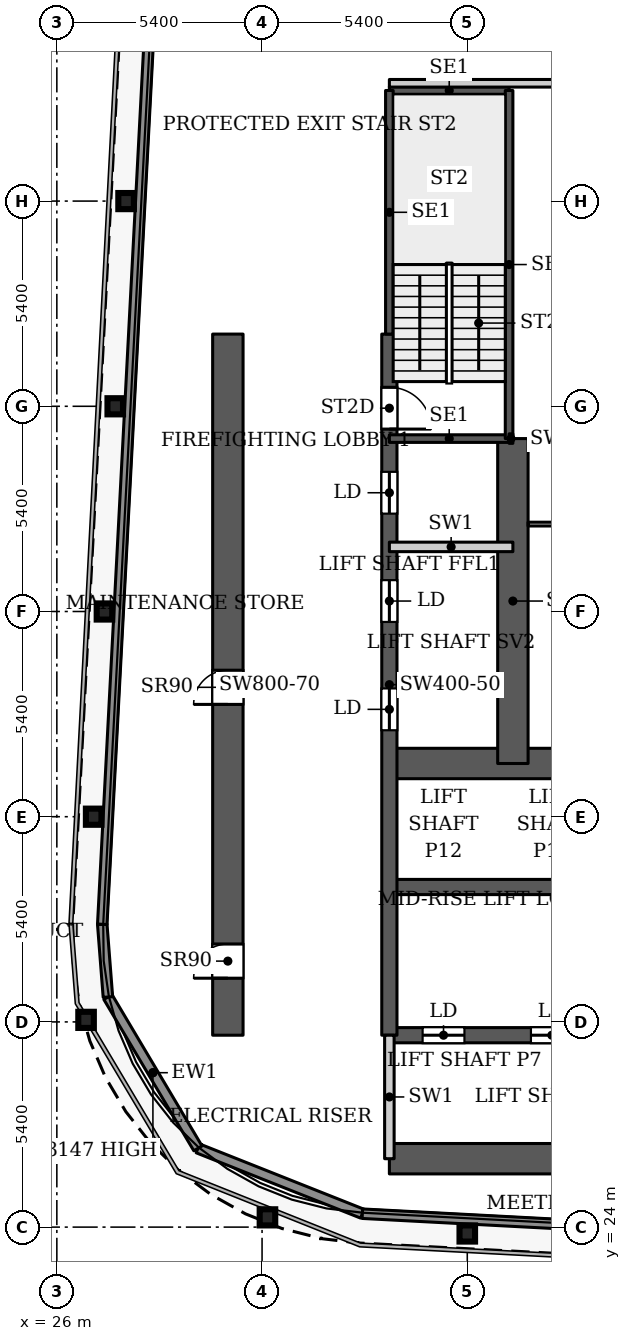
"""IFC4 building model, lengths in metres.
Left out: names, types, materials, properties, quantities, classifications, styles, units other than length and angle.
Written with IfcOpenShell. Run it as: python <this file> out.ifc"""

import sys

from ifc_helpers import new_model, si_unit, direction, frame, frame_2d, origin, origin_2d, place, context, subcontext, project, spatial, rectangle, i_section, extrude, source, transform, mapped, element, fill, save


model = new_model("IFC4")
c1 = context("Model", 3, precision=1e-05, world=origin(), true_north=direction((0.0, 1.0)))
c2 = subcontext(c1, "Body", "Model", "MODEL_VIEW")
j1 = project(units=[si_unit("LENGTHUNIT", "METRE"), si_unit("PLANEANGLEUNIT", "RADIAN")], contexts=[c1])
p1 = place(None, origin())
s1 = spatial("IfcSite", under=j1, at=p1, CompositionType="ELEMENT")
p2 = place(p1, origin())
s2 = spatial("IfcBuilding", under=s1, at=p2, CompositionType="ELEMENT")
p3 = place(p2, frame((0.0, 0.0, 187.7)))
s3 = spatial("IfcBuildingStorey", under=s2, at=p3, CompositionType="ELEMENT", Elevation=187.7)
for number, where, z_axis, x_axis in (
    (1, (36.8, 23.832, 0.0), (0.0, 0.0, 1.0), (1.0, 0.0, 0.0)),
    (2, (31.542, 24.257, 0.0), (0.0, 0.0, 1.0), (1.0, 0.0, 0.0)),
    (3, (26.769, 29.454, 0.0), (0.0, 0.0, 1.0), (1.0, 0.0, 0.0)),
    (4, (26.969, 34.8, 0.0), (0.0, 0.0, 1.0), (1.0, 0.0, 0.0)),
    (5, (27.253, 40.2, 0.0), (0.0, 0.0, 1.0), (1.0, 0.0, 0.0)),
    (6, (27.537, 45.6, 0.0), (0.0, 0.0, 1.0), (1.0, 0.0, 0.0)),
    (7, (27.822, 51.0, 0.0), (0.0, 0.0, 1.0), (1.0, 0.0, 0.0)),
):
    element("IfcColumn", number, at=place(p3, frame(where, z_axis=z_axis, x_axis=x_axis)), inside=s3, PredefinedType="COLUMN", context=c2, shape_type="SweptSolid", body=[
        extrude(i_section(OverallWidth=0.409, OverallDepth=0.425, WebThickness=0.033, FlangeThickness=0.052, FilletRadius=0.013, at=origin_2d()), origin(), (0.0, 0.0, 1.0), 3.9),
    ])
p4 = place(p3, frame((34.75, 25.8, 0.0), z_axis=(0.0, 0.0, 1.0), x_axis=(1.0, 0.0, 0.0)))
e8 = element("IfcWall", 8, at=p4, inside=s3, PredefinedType="SHEAR", context=c2, shape_type="SweptSolid", body=[
    extrude(rectangle(XDim=18.4, YDim=0.8, at=frame_2d((9.2, 0.0))), origin(), (0.0, 0.0, 1.0), 3.9),
])
p5 = place(p3, frame((34.75, 29.05, 0.0), z_axis=(0.0, 0.0, 1.0), x_axis=(1.0, 0.0, 0.0)))
e9 = element("IfcWall", 9, at=p5, inside=s3, PredefinedType="SHEAR", context=c2, shape_type="SweptSolid", body=[
    extrude(rectangle(XDim=18.4, YDim=0.4, at=frame_2d((9.2, 0.0))), origin(), (0.0, 0.0, 1.0), 3.9),
])
p6 = place(p5, frame((0.875, 0.0, 0.0)))
e10 = element("IfcOpeningElement", 10, at=p6, cuts=e9, PredefinedType="OPENING", context=c2, shape_type="SweptSolid", body=[
    extrude(rectangle(XDim=1.1, YDim=2.2, at=frame_2d((0.55, 1.1))), frame((0.0, 0.21, 0.0), z_axis=(0.0, -1.0, 0.0), x_axis=(1.0, 0.0, 0.0)), (0.0, 0.0, 1.0), 0.42),
])
p7 = place(p5, frame((3.725, 0.0, 0.0)))
e11 = element("IfcOpeningElement", 11, at=p7, cuts=e9, PredefinedType="OPENING", context=c2, shape_type="SweptSolid", body=[
    extrude(rectangle(XDim=1.1, YDim=2.2, at=frame_2d((0.55, 1.1))), frame((0.0, 0.21, 0.0), z_axis=(0.0, -1.0, 0.0), x_axis=(1.0, 0.0, 0.0)), (0.0, 0.0, 1.0), 0.42),
])
p8 = place(p5, frame((6.575, 0.0, 0.0)))
e12 = element("IfcOpeningElement", 12, at=p8, cuts=e9, PredefinedType="OPENING", context=c2, shape_type="SweptSolid", body=[
    extrude(rectangle(XDim=1.1, YDim=2.2, at=frame_2d((0.55, 1.1))), frame((0.0, 0.21, 0.0), z_axis=(0.0, -1.0, 0.0), x_axis=(1.0, 0.0, 0.0)), (0.0, 0.0, 1.0), 0.42),
])
p9 = place(p5, frame((9.425, 0.0, 0.0)))
e13 = element("IfcOpeningElement", 13, at=p9, cuts=e9, PredefinedType="OPENING", context=c2, shape_type="SweptSolid", body=[
    extrude(rectangle(XDim=1.1, YDim=2.2, at=frame_2d((0.55, 1.1))), frame((0.0, 0.21, 0.0), z_axis=(0.0, -1.0, 0.0), x_axis=(1.0, 0.0, 0.0)), (0.0, 0.0, 1.0), 0.42),
])
p10 = place(p5, frame((12.275, 0.0, 0.0)))
e14 = element("IfcOpeningElement", 14, at=p10, cuts=e9, PredefinedType="OPENING", context=c2, shape_type="SweptSolid", body=[
    extrude(rectangle(XDim=1.1, YDim=2.2, at=frame_2d((0.55, 1.1))), frame((0.0, 0.21, 0.0), z_axis=(0.0, -1.0, 0.0), x_axis=(1.0, 0.0, 0.0)), (0.0, 0.0, 1.0), 0.42),
])
p11 = place(p5, frame((15.125, 0.0, 0.0)))
e15 = element("IfcOpeningElement", 15, at=p11, cuts=e9, PredefinedType="OPENING", context=c2, shape_type="SweptSolid", body=[
    extrude(rectangle(XDim=1.1, YDim=2.2, at=frame_2d((0.55, 1.1))), frame((0.0, 0.21, 0.0), z_axis=(0.0, -1.0, 0.0), x_axis=(1.0, 0.0, 0.0)), (0.0, 0.0, 1.0), 0.42),
])
p12 = place(p3, frame((34.75, 32.95, 0.0), z_axis=(0.0, 0.0, 1.0), x_axis=(1.0, 0.0, 0.0)))
e16 = element("IfcWall", 16, at=p12, inside=s3, PredefinedType="SHEAR", context=c2, shape_type="SweptSolid", body=[
    extrude(rectangle(XDim=14.25, YDim=0.4, at=frame_2d((7.125, 0.0))), origin(), (0.0, 0.0, 1.0), 3.9),
])
p13 = place(p3, frame((34.75, 36.2, 0.0), z_axis=(0.0, 0.0, 1.0), x_axis=(1.0, 0.0, 0.0)))
e17 = element("IfcWall", 17, at=p13, inside=s3, PredefinedType="SHEAR", context=c2, shape_type="SweptSolid", body=[
    extrude(rectangle(XDim=18.4, YDim=0.8, at=frame_2d((9.2, 0.0))), origin(), (0.0, 0.0, 1.0), 3.9),
])
p14 = place(p13, frame((16.9, 0.0, 0.0)))
e18 = element("IfcOpeningElement", 18, at=p14, cuts=e17, PredefinedType="OPENING", context=c2, shape_type="SweptSolid", body=[
    extrude(rectangle(XDim=1.0, YDim=2.2, at=frame_2d((0.5, 1.1))), frame((0.0, 0.41, 0.0), z_axis=(0.0, -1.0, 0.0), x_axis=(1.0, 0.0, 0.0)), (0.0, 0.0, 1.0), 0.82),
])
p15 = place(p3, frame((34.75, 29.05, 0.0), z_axis=(0.0, 0.0, 1.0), x_axis=(0.0, 1.0, 0.0)))
e19 = element("IfcWall", 19, at=p15, inside=s3, PredefinedType="SHEAR", context=c2, shape_type="SweptSolid", body=[
    extrude(rectangle(XDim=18.45, YDim=0.4, at=frame_2d((9.225, 0.0))), origin(), (0.0, 0.0, 1.0), 3.9),
])
p16 = place(p15, frame((8.025, 0.0, 0.0)))
e20 = element("IfcOpeningElement", 20, at=p16, cuts=e19, PredefinedType="OPENING", context=c2, shape_type="SweptSolid", body=[
    extrude(rectangle(XDim=1.1, YDim=2.2, at=frame_2d((0.55, 1.1))), frame((0.0, 0.21, 0.0), z_axis=(0.0, -1.0, 0.0), x_axis=(1.0, 0.0, 0.0)), (0.0, 0.0, 1.0), 0.42),
])
p17 = place(p15, frame((10.875, 0.0, 0.0)))
e21 = element("IfcOpeningElement", 21, at=p17, cuts=e19, PredefinedType="OPENING", context=c2, shape_type="SweptSolid", body=[
    extrude(rectangle(XDim=1.1, YDim=2.2, at=frame_2d((0.55, 1.1))), frame((0.0, 0.21, 0.0), z_axis=(0.0, -1.0, 0.0), x_axis=(1.0, 0.0, 0.0)), (0.0, 0.0, 1.0), 0.42),
])
p18 = place(p15, frame((13.725, 0.0, 0.0)))
e22 = element("IfcOpeningElement", 22, at=p18, cuts=e19, PredefinedType="OPENING", context=c2, shape_type="SweptSolid", body=[
    extrude(rectangle(XDim=1.1, YDim=2.2, at=frame_2d((0.55, 1.1))), frame((0.0, 0.21, 0.0), z_axis=(0.0, -1.0, 0.0), x_axis=(1.0, 0.0, 0.0)), (0.0, 0.0, 1.0), 0.42),
])
p19 = place(p15, frame((15.95, 0.0, 0.0)))
e23 = element("IfcOpeningElement", 23, at=p19, cuts=e19, PredefinedType="OPENING", context=c2, shape_type="SweptSolid", body=[
    extrude(rectangle(XDim=1.1, YDim=2.2, at=frame_2d((0.55, 1.1))), frame((0.0, 0.21, 0.0), z_axis=(0.0, -1.0, 0.0), x_axis=(1.0, 0.0, 0.0)), (0.0, 0.0, 1.0), 0.42),
])
p20 = place(p3, frame((38.0, 36.2, 0.0), z_axis=(0.0, 0.0, 1.0), x_axis=(0.0, 1.0, 0.0)))
e24 = element("IfcWall", 24, at=p20, inside=s3, PredefinedType="SHEAR", context=c2, shape_type="SweptSolid", body=[
    extrude(rectangle(XDim=8.55, YDim=0.8, at=frame_2d((4.275, 0.0))), origin(), (0.0, 0.0, 1.0), 3.9),
])
p21 = place(p3, frame((30.5, 29.05, 0.0), z_axis=(0.0, 0.0, 1.0), x_axis=(0.0, 1.0, 0.0)))
e25 = element("IfcWall", 25, at=p21, inside=s3, PredefinedType="SHEAR", context=c2, shape_type="SweptSolid", body=[
    extrude(rectangle(XDim=18.45, YDim=0.8, at=frame_2d((9.225, 0.0))), origin(), (0.0, 0.0, 1.0), 3.9),
])
p22 = place(p21, frame((1.5, 0.0, 0.0)))
e26 = element("IfcOpeningElement", 26, at=p22, cuts=e25, PredefinedType="OPENING", context=c2, shape_type="SweptSolid", body=[
    extrude(rectangle(XDim=0.9, YDim=2.2, at=frame_2d((0.45, 1.1))), frame((0.0, 0.41, 0.0), z_axis=(0.0, -1.0, 0.0), x_axis=(1.0, 0.0, 0.0)), (0.0, 0.0, 1.0), 0.82),
])
p23 = place(p21, frame((8.705, 0.0, 0.0)))
e27 = element("IfcOpeningElement", 27, at=p23, cuts=e25, PredefinedType="OPENING", context=c2, shape_type="SweptSolid", body=[
    extrude(rectangle(XDim=0.9, YDim=2.2, at=frame_2d((0.45, 1.1))), frame((0.0, 0.41, 0.0), z_axis=(0.0, -1.0, 0.0), x_axis=(1.0, 0.0, 0.0)), (0.0, 0.0, 1.0), 0.82),
])
p24 = place(p3, frame((34.039, 24.353, 0.0), z_axis=(0.0, 0.0, 1.0), x_axis=(-0.929352825399, 0.369192803184, 0.0)))
e28 = element("IfcWall", 28, at=p24, inside=s3, PredefinedType="SOLIDWALL", context=c2, shape_type="SweptSolid", body=[
    extrude(rectangle(XDim=4.656, YDim=0.25, at=frame_2d((2.328, 0.0))), origin(), (0.0, 0.0, 1.0), 3.75),
])
p25 = place(p3, frame((29.712, 26.072, 0.0), z_axis=(0.0, 0.0, 1.0), x_axis=(-0.511028049012, 0.859564036662, 0.0)))
e29 = element("IfcWall", 29, at=p25, inside=s3, PredefinedType="SOLIDWALL", context=c2, shape_type="SweptSolid", body=[
    extrude(rectangle(XDim=4.634, YDim=0.25, at=frame_2d((2.317, 0.0))), origin(), (0.0, 0.0, 1.0), 3.147),
])
p26 = place(p3, frame((27.344, 30.055, 0.0), z_axis=(0.0, 0.0, 1.0), x_axis=(-0.077571675317, 0.99698677784, 0.0)))
e30 = element("IfcWall", 30, at=p26, inside=s3, PredefinedType="SOLIDWALL", context=c2, shape_type="SweptSolid", body=[
    extrude(rectangle(XDim=1.92, YDim=0.25, at=frame_2d((0.96, 0.0))), origin(), (0.0, 0.0, 1.0), 3.75),
])
p27 = place(p3, frame((27.195, 31.969, 0.0), z_axis=(0.0, 0.0, 1.0), x_axis=(0.052554995867, 0.998618031286, 0.0)))
e31 = element("IfcWall", 31, at=p27, inside=s3, PredefinedType="SOLIDWALL", context=c2, shape_type="SweptSolid", body=[
    extrude(rectangle(XDim=66.787, YDim=0.25, at=frame_2d((33.394, 0.0))), origin(), (0.0, 0.0, 1.0), 3.75),
])
p28 = place(p3, frame((100.586, 20.85, 0.0), z_axis=(0.0, 0.0, 1.0), x_axis=(-0.99861746497, 0.052565755559, 0.0)))
e32 = element("IfcWall", 32, at=p28, inside=s3, PredefinedType="SOLIDWALL", context=c2, shape_type="SweptSolid", body=[
    extrude(rectangle(XDim=66.639, YDim=0.25, at=frame_2d((33.319, 0.0))), origin(), (0.0, 0.0, 1.0), 3.75),
])
for number, where, z_axis, x_axis in (
    (33, (34.75, 44.75, 0.0), (0.0, 0.0, 1.0), (1.0, 0.0, 0.0)),
    (34, (34.75, 53.91, 0.0), (0.0, 0.0, 1.0), (1.0, 0.0, 0.0)),
):
    element("IfcWall", number, at=place(p3, frame(where, z_axis=z_axis, x_axis=x_axis)), inside=s3, PredefinedType="SHEAR", context=c2, shape_type="SweptSolid", body=[
        extrude(rectangle(XDim=3.15, YDim=0.2, at=frame_2d((1.575, 0.0))), origin(), (0.0, 0.0, 1.0), 3.9),
    ])
p29 = place(p3, frame((34.75, 47.5, 0.0), z_axis=(0.0, 0.0, 1.0), x_axis=(0.0, 1.0, 0.0)))
e35 = element("IfcWall", 35, at=p29, inside=s3, PredefinedType="SHEAR", context=c2, shape_type="SweptSolid", body=[
    extrude(rectangle(XDim=6.41, YDim=0.2, at=frame_2d((3.205, 0.0))), origin(), (0.0, 0.0, 1.0), 3.9),
])
p30 = place(p3, frame((37.9, 44.75, 0.0), z_axis=(0.0, 0.0, 1.0), x_axis=(0.0, 1.0, 0.0)))
e36 = element("IfcWall", 36, at=p30, inside=s3, PredefinedType="SHEAR", context=c2, shape_type="SweptSolid", body=[
    extrude(rectangle(XDim=9.16, YDim=0.2, at=frame_2d((4.58, 0.0))), origin(), (0.0, 0.0, 1.0), 3.9),
])
for number, where, z_axis, x_axis in (
    (37, (34.75, 25.8, 0.0), (0.0, 0.0, 1.0), (0.0, 1.0, 0.0)),
    (38, (34.75, 41.9, 0.0), (0.0, 0.0, 1.0), (1.0, 0.0, 0.0)),
):
    element("IfcWall", number, at=place(p3, frame(where, z_axis=z_axis, x_axis=x_axis)), inside=s3, PredefinedType="PARTITIONING", context=c2, shape_type="SweptSolid", body=[
        extrude(rectangle(XDim=3.25, YDim=0.25, at=frame_2d((1.625, 0.0))), origin(), (0.0, 0.0, 1.0), 3.9),
    ])
p31 = place(p3, frame((37.9, 44.75, 0.0), z_axis=(0.0, 0.0, 1.0), x_axis=(1.0, 0.0, 0.0)))
e39 = element("IfcWall", 39, at=p31, inside=s3, PredefinedType="PARTITIONING", context=c2, shape_type="SweptSolid", body=[
    extrude(rectangle(XDim=0.1, YDim=0.25, at=frame_2d((0.05, 0.0))), origin(), (0.0, 0.0, 1.0), 3.9),
])
p32 = place(p3, frame((34.75, 54.1, 0.0), z_axis=(0.0, 0.0, 1.0), x_axis=(1.0, 0.0, 0.0)))
e40 = element("IfcWall", 40, at=p32, inside=s3, PredefinedType="PARTITIONING", context=c2, shape_type="SweptSolid", body=[
    extrude(rectangle(XDim=11.15, YDim=0.2, at=frame_2d((5.575, 0.0))), origin(), (0.0, 0.0, 1.0), 3.6),
])
p33 = place(p32, frame((5.075, 0.0, 0.0)))
e41 = element("IfcOpeningElement", 41, at=p33, cuts=e40, PredefinedType="OPENING", context=c2, shape_type="SweptSolid", body=[
    extrude(rectangle(XDim=1.0, YDim=2.1, at=frame_2d((0.5, 1.05))), frame((0.0, 0.11, 0.0), z_axis=(0.0, -1.0, 0.0), x_axis=(1.0, 0.0, 0.0)), (0.0, 0.0, 1.0), 0.22),
])
p34 = place(p3, frame((38.399, 42.5, 0.0), z_axis=(0.0, 0.0, 1.0), x_axis=(1.0, 0.0, 0.0)))
e42 = element("IfcWall", 42, at=p34, inside=s3, PredefinedType="PARTITIONING", context=c2, shape_type="SweptSolid", body=[
    extrude(rectangle(XDim=14.901, YDim=0.1, at=frame_2d((7.451, 0.0))), origin(), (0.0, 0.0, 1.0), 3.6),
])
p35 = place(p34, frame((6.801, 0.0, 0.0)))
e43 = element("IfcOpeningElement", 43, at=p35, cuts=e42, PredefinedType="OPENING", context=c2, shape_type="SweptSolid", body=[
    extrude(rectangle(XDim=1.0, YDim=2.1, at=frame_2d((0.5, 1.05))), frame((0.0, 0.06, 0.0), z_axis=(0.0, -1.0, 0.0), x_axis=(1.0, 0.0, 0.0)), (0.0, 0.0, 1.0), 0.12),
])
m1 = source(origin(), c2, "Body", "SweptSolid", [
    extrude(rectangle(XDim=1.1, YDim=2.2, at=frame_2d((0.55, 1.1))), frame((0.0, 0.025, 0.0), z_axis=(0.0, -1.0, 0.0), x_axis=(1.0, 0.0, 0.0)), (0.0, 0.0, 1.0), 0.05),
])
p36 = place(p6, origin())
e44 = element("IfcDoor", 44, at=p36, inside=s3, OperationType="SLIDING_TO_LEFT", PredefinedType="DOOR", context=c2, shape_type="MappedRepresentation", body=[
    mapped(m1, transform((0.0, 0.0, 0.0), x_axis=(1.0, 0.0, 0.0), y_axis=(0.0, 1.0, 0.0), z_axis=(0.0, 0.0, 1.0), scale=1.0)),
])
fill(e10, e44)
p37 = place(p7, origin())
e45 = element("IfcDoor", 45, at=p37, inside=s3, OperationType="SLIDING_TO_LEFT", PredefinedType="DOOR", context=c2, shape_type="MappedRepresentation", body=[
    mapped(m1, transform((0.0, 0.0, 0.0), x_axis=(1.0, 0.0, 0.0), y_axis=(0.0, 1.0, 0.0), z_axis=(0.0, 0.0, 1.0), scale=1.0)),
])
fill(e11, e45)
p38 = place(p16, origin())
e46 = element("IfcDoor", 46, at=p38, inside=s3, OperationType="SLIDING_TO_LEFT", PredefinedType="DOOR", context=c2, shape_type="MappedRepresentation", body=[
    mapped(m1, transform((0.0, 0.0, 0.0), x_axis=(1.0, 0.0, 0.0), y_axis=(0.0, 1.0, 0.0), z_axis=(0.0, 0.0, 1.0), scale=1.0)),
])
fill(e20, e46)
p39 = place(p17, origin())
e47 = element("IfcDoor", 47, at=p39, inside=s3, OperationType="SLIDING_TO_LEFT", PredefinedType="DOOR", context=c2, shape_type="MappedRepresentation", body=[
    mapped(m1, transform((0.0, 0.0, 0.0), x_axis=(1.0, 0.0, 0.0), y_axis=(0.0, 1.0, 0.0), z_axis=(0.0, 0.0, 1.0), scale=1.0)),
])
fill(e21, e47)
p40 = place(p18, origin())
e48 = element("IfcDoor", 48, at=p40, inside=s3, OperationType="SLIDING_TO_LEFT", PredefinedType="DOOR", context=c2, shape_type="MappedRepresentation", body=[
    mapped(m1, transform((0.0, 0.0, 0.0), x_axis=(1.0, 0.0, 0.0), y_axis=(0.0, 1.0, 0.0), z_axis=(0.0, 0.0, 1.0), scale=1.0)),
])
fill(e22, e48)
m2 = source(origin(), c2, "Body", "SweptSolid", [
    extrude(rectangle(XDim=0.9, YDim=2.2, at=frame_2d((0.45, 1.1))), frame((0.0, 0.025, 0.0), z_axis=(0.0, -1.0, 0.0), x_axis=(1.0, 0.0, 0.0)), (0.0, 0.0, 1.0), 0.05),
])
p41 = place(p22, origin())
e49 = element("IfcDoor", 49, at=p41, inside=s3, OperationType="SINGLE_SWING_LEFT", PredefinedType="DOOR", context=c2, shape_type="MappedRepresentation", body=[
    mapped(m2, transform((0.0, 0.0, 0.0), x_axis=(1.0, 0.0, 0.0), y_axis=(0.0, 1.0, 0.0), z_axis=(0.0, 0.0, 1.0), scale=1.0)),
])
fill(e26, e49)
p42 = place(p23, origin())
e50 = element("IfcDoor", 50, at=p42, inside=s3, OperationType="SINGLE_SWING_LEFT", PredefinedType="DOOR", context=c2, shape_type="MappedRepresentation", body=[
    mapped(m2, transform((0.0, 0.0, 0.0), x_axis=(1.0, 0.0, 0.0), y_axis=(0.0, 1.0, 0.0), z_axis=(0.0, 0.0, 1.0), scale=1.0)),
])
fill(e27, e50)
m3 = source(origin(), c2, "Body", "SweptSolid", [
    extrude(rectangle(XDim=1.1, YDim=2.2, at=frame_2d((0.55, 1.1))), frame((0.0, 0.025, 0.0), z_axis=(0.0, -1.0, 0.0), x_axis=(1.0, 0.0, 0.0)), (0.0, 0.0, 1.0), 0.05),
])
p43 = place(p19, origin())
e51 = element("IfcDoor", 51, at=p43, inside=s3, OperationType="SINGLE_SWING_RIGHT", PredefinedType="DOOR", context=c2, shape_type="MappedRepresentation", body=[
    mapped(m3, transform((0.0, 0.0, 0.0), x_axis=(1.0, 0.0, 0.0), y_axis=(0.0, 1.0, 0.0), z_axis=(0.0, 0.0, 1.0), scale=1.0)),
])
fill(e23, e51)
save(model, sys.argv[1])
